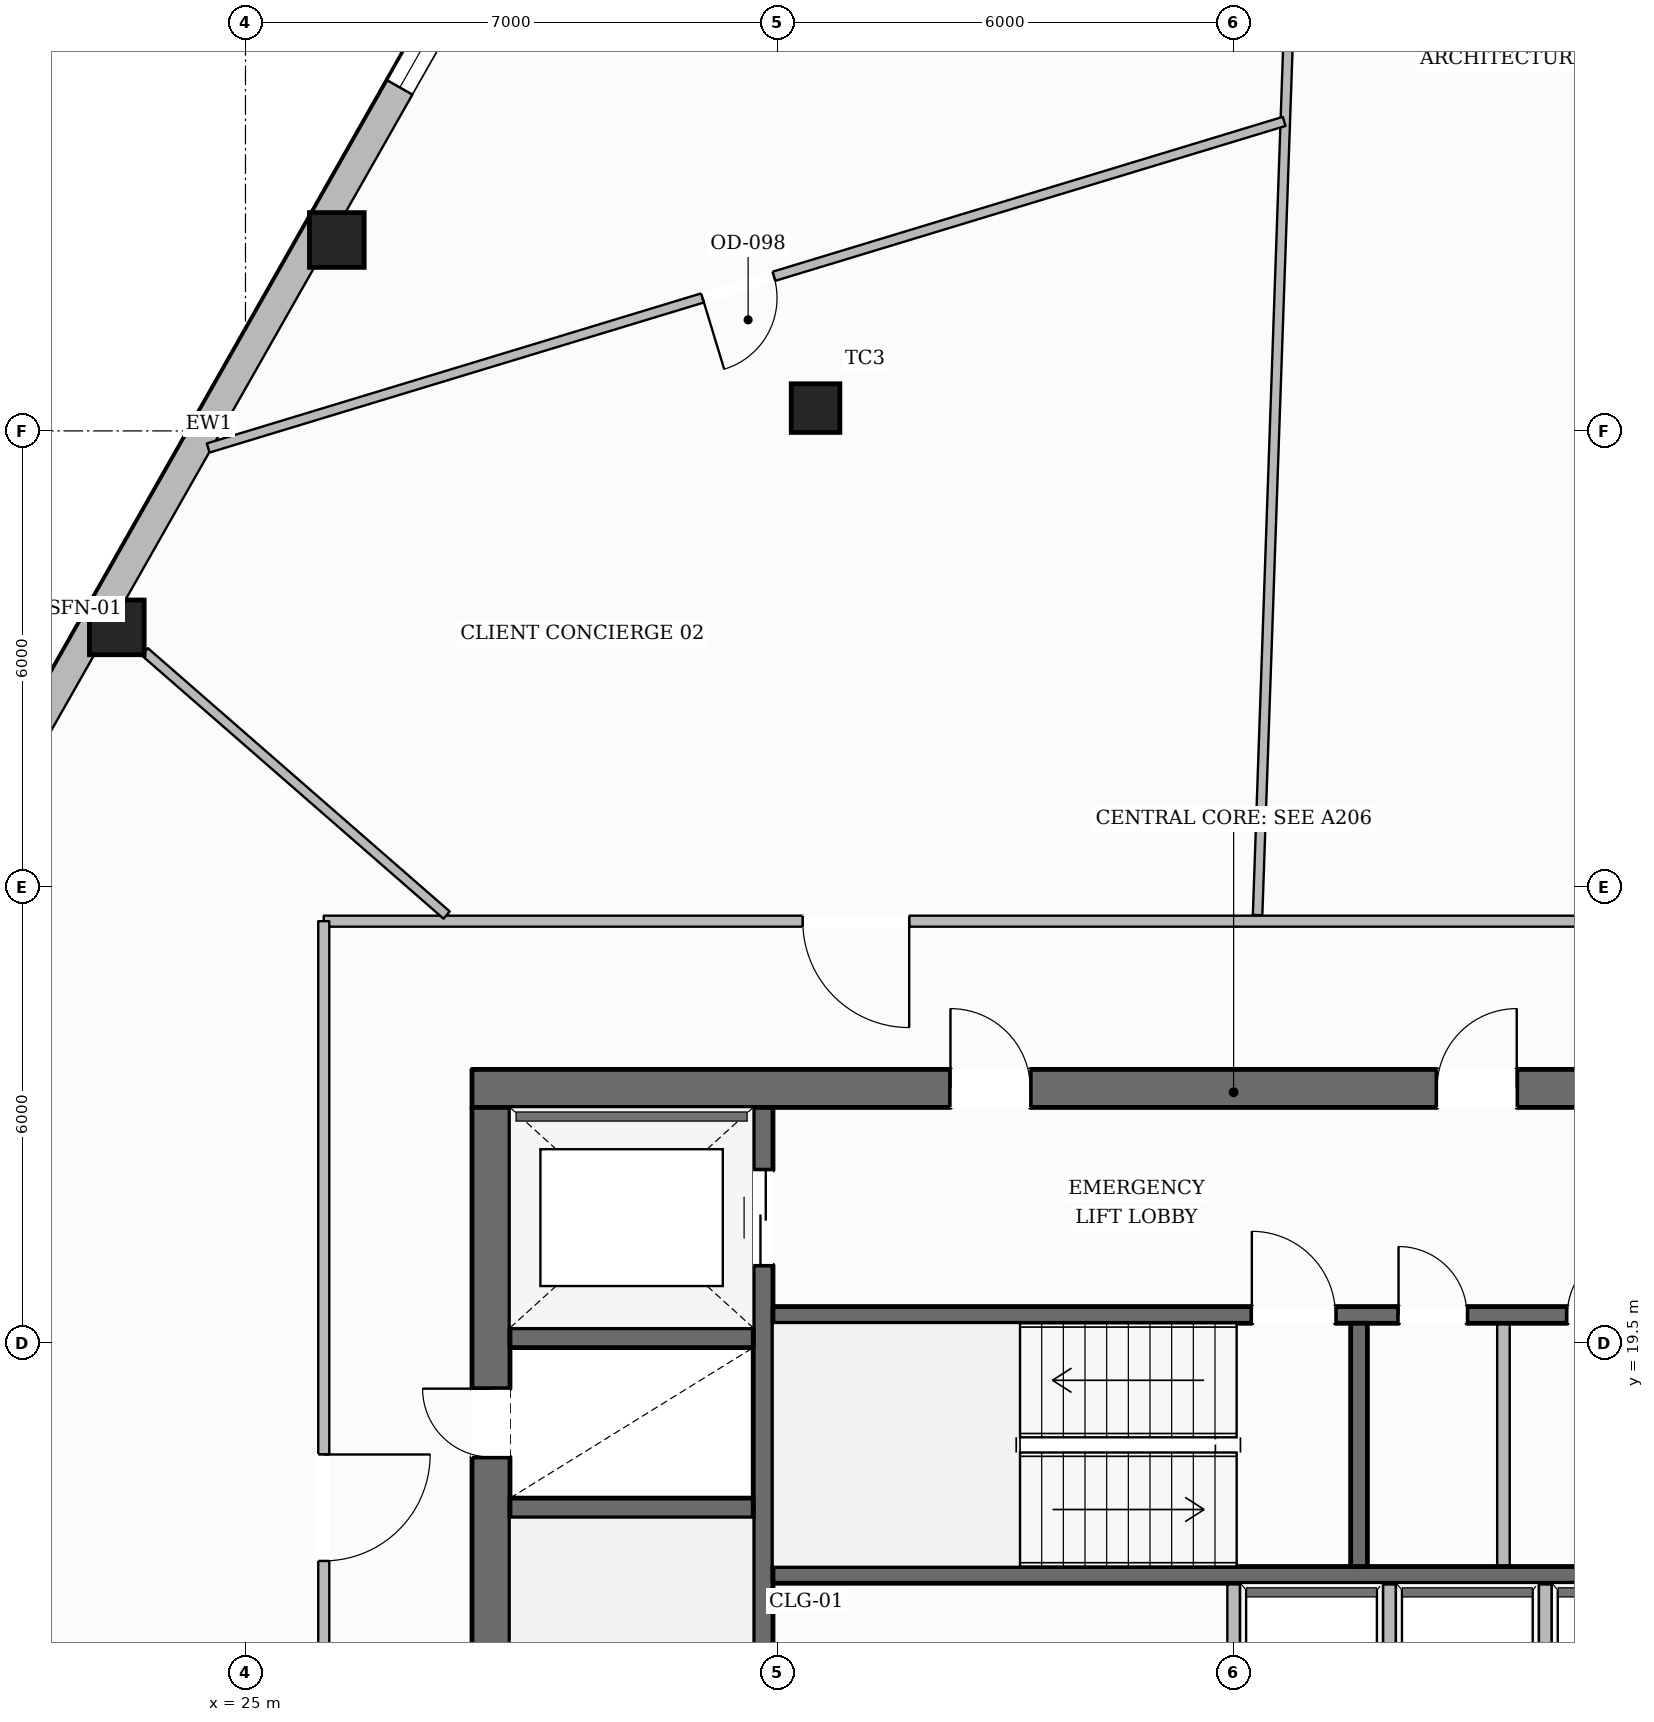
"""IFC4 building model, lengths in metres.
Left out: names, types, materials, properties, quantities, classifications, styles, units other than length and angle.
Written with IfcOpenShell. Run it as: python <this file> out.ifc"""

import sys

from ifc_helpers import new_model, si_unit, direction, frame, frame_2d, origin, origin_2d, place, context, subcontext, project, spatial, rectangle, hollow_rectangle, extrude, element, fill, save


model = new_model("IFC4")
c1 = context("Model", 3, precision=1e-05, world=origin(), true_north=direction((0.0, 1.0)))
c2 = subcontext(c1, "Body", "Model", "MODEL_VIEW")
j1 = project(units=[si_unit("LENGTHUNIT", "METRE"), si_unit("PLANEANGLEUNIT", "RADIAN")], contexts=[c1])
p1 = place(None, origin())
s1 = spatial("IfcSite", under=j1, at=p1, CompositionType="ELEMENT")
p2 = place(p1, origin())
s2 = spatial("IfcBuilding", under=s1, at=p2, CompositionType="ELEMENT")
p3 = place(p2, frame((0.0, 0.0, 104.75)))
s3 = spatial("IfcBuildingStorey", under=s2, at=p3, CompositionType="ELEMENT", Elevation=104.75)
p4 = place(p3, frame((27.98, 22.85, 0.0), z_axis=(0.0, 0.0, 1.0), x_axis=(1.0, 0.0, 0.0)))
e1 = element("IfcWall", 1, at=p4, inside=s3, PredefinedType="SOLIDWALL", context=c2, shape_type="SweptSolid", body=[
    extrude(rectangle(XDim=20.04, YDim=0.5, at=frame_2d((10.02, 0.0))), origin(), (0.0, 0.0, 1.0), 3.6),
])
p5 = place(p4, frame((6.295, 0.0, 0.0)))
e2 = element("IfcOpeningElement", 2, at=p5, cuts=e1, PredefinedType="OPENING", context=c2, shape_type="SweptSolid", body=[
    extrude(rectangle(XDim=1.05, YDim=2.15, at=frame_2d((0.525, 1.075))), frame((0.0, 0.26, 0.0), z_axis=(0.0, -1.0, 0.0), x_axis=(1.0, 0.0, 0.0)), (0.0, 0.0, 1.0), 0.52),
])
p6 = place(p4, frame((12.695, 0.0, 0.0)))
e3 = element("IfcOpeningElement", 3, at=p6, cuts=e1, PredefinedType="OPENING", context=c2, shape_type="SweptSolid", body=[
    extrude(rectangle(XDim=1.05, YDim=2.15, at=frame_2d((0.525, 1.075))), frame((0.0, 0.26, 0.0), z_axis=(0.0, -1.0, 0.0), x_axis=(1.0, 0.0, 0.0)), (0.0, 0.0, 1.0), 0.52),
])
p7 = place(p3, frame((28.23, 9.6, 0.0), z_axis=(0.0, 0.0, 1.0), x_axis=(0.0, 1.0, 0.0)))
e4 = element("IfcWall", 4, at=p7, inside=s3, PredefinedType="SOLIDWALL", context=c2, shape_type="SweptSolid", body=[
    extrude(rectangle(XDim=13.0, YDim=0.5, at=frame_2d((6.5, 0.0))), origin(), (0.0, 0.0, 1.0), 3.6),
])
p8 = place(p7, frame((0.2, 0.0, 0.0)))
e5 = element("IfcOpeningElement", 5, at=p8, cuts=e4, PredefinedType="OPENING", context=c2, shape_type="SweptSolid", body=[
    extrude(rectangle(XDim=1.1, YDim=2.15, at=frame_2d((0.55, 1.075))), frame((0.0, 0.26, 0.0), z_axis=(0.0, -1.0, 0.0), x_axis=(1.0, 0.0, 0.0)), (0.0, 0.0, 1.0), 0.52),
])
p9 = place(p7, frame((8.4, 0.0, 0.0)))
e6 = element("IfcOpeningElement", 6, at=p9, cuts=e4, PredefinedType="OPENING", context=c2, shape_type="SweptSolid", body=[
    extrude(rectangle(XDim=0.9, YDim=2.1, at=frame_2d((0.45, 1.05))), frame((0.0, 0.26, 0.0), z_axis=(0.0, -1.0, 0.0), x_axis=(1.0, 0.0, 0.0)), (0.0, 0.0, 1.0), 0.52),
])
p10 = place(p3, frame((31.81, 9.6, 0.0), z_axis=(0.0, 0.0, 1.0), x_axis=(0.0, 1.0, 0.0)))
e7 = element("IfcWall", 7, at=p10, inside=s3, PredefinedType="SHEAR", context=c2, shape_type="SweptSolid", body=[
    extrude(rectangle(XDim=13.0, YDim=0.26, at=frame_2d((6.5, 0.0))), origin(), (0.0, 0.0, 1.0), 3.6),
])
p11 = place(p10, frame((10.925, 0.0, 0.0)))
e8 = element("IfcOpeningElement", 8, at=p11, cuts=e7, PredefinedType="OPENING", context=c2, shape_type="SweptSolid", body=[
    extrude(rectangle(XDim=1.25, YDim=2.25, at=frame_2d((0.625, 1.125))), frame((0.0, 0.14, 0.0), z_axis=(0.0, -1.0, 0.0), x_axis=(1.0, 0.0, 0.0)), (0.0, 0.0, 1.0), 0.28),
])
for number, where, z_axis, x_axis in (
    (9, (28.48, 17.33, 0.0), (0.0, 0.0, 1.0), (1.0, 0.0, 0.0)),
    (10, (28.48, 19.57, 0.0), (0.0, 0.0, 1.0), (1.0, 0.0, 0.0)),
):
    element("IfcWall", number, at=place(p3, frame(where, z_axis=z_axis, x_axis=x_axis)), inside=s3, PredefinedType="SHEAR", context=c2, shape_type="SweptSolid", body=[
        extrude(rectangle(XDim=3.2, YDim=0.26, at=frame_2d((1.6, 0.0))), origin(), (0.0, 0.0, 1.0), 3.6),
    ])
p12 = place(p3, frame((31.94, 19.87, 0.0), z_axis=(0.0, 0.0, 1.0), x_axis=(1.0, 0.0, 0.0)))
e11 = element("IfcWall", 11, at=p12, inside=s3, PredefinedType="SOLIDWALL", context=c2, shape_type="SweptSolid", body=[
    extrude(rectangle(XDim=12.12, YDim=0.22, at=frame_2d((6.06, 0.0))), origin(), (0.0, 0.0, 1.0), 3.6),
])
p13 = place(p12, frame((6.3, 0.0, 0.0)))
e12 = element("IfcOpeningElement", 12, at=p13, cuts=e11, PredefinedType="OPENING", context=c2, shape_type="SweptSolid", body=[
    extrude(rectangle(XDim=1.1, YDim=2.15, at=frame_2d((0.55, 1.075))), frame((0.0, 0.12, 0.0), z_axis=(0.0, -1.0, 0.0), x_axis=(1.0, 0.0, 0.0)), (0.0, 0.0, 1.0), 0.24),
])
p14 = place(p12, frame((8.23, 0.0, 0.0)))
e13 = element("IfcOpeningElement", 13, at=p14, cuts=e11, PredefinedType="OPENING", context=c2, shape_type="SweptSolid", body=[
    extrude(rectangle(XDim=0.9, YDim=2.1, at=frame_2d((0.45, 1.05))), frame((0.0, 0.12, 0.0), z_axis=(0.0, -1.0, 0.0), x_axis=(1.0, 0.0, 0.0)), (0.0, 0.0, 1.0), 0.24),
])
p15 = place(p12, frame((10.45, 0.0, 0.0)))
e14 = element("IfcOpeningElement", 14, at=p15, cuts=e11, PredefinedType="OPENING", context=c2, shape_type="SweptSolid", body=[
    extrude(rectangle(XDim=0.9, YDim=2.1, at=frame_2d((0.45, 1.05))), frame((0.0, 0.12, 0.0), z_axis=(0.0, -1.0, 0.0), x_axis=(1.0, 0.0, 0.0)), (0.0, 0.0, 1.0), 0.24),
])
p16 = place(p3, frame((31.94, 16.45, 0.0), z_axis=(0.0, 0.0, 1.0), x_axis=(1.0, 0.0, 0.0)))
e15 = element("IfcWall", 15, at=p16, inside=s3, PredefinedType="SOLIDWALL", context=c2, shape_type="SweptSolid", body=[
    extrude(rectangle(XDim=12.12, YDim=0.22, at=frame_2d((6.06, 0.0))), origin(), (0.0, 0.0, 1.0), 3.6),
])
p17 = place(p3, frame((39.65, 16.56, 0.0), z_axis=(0.0, 0.0, 1.0), x_axis=(0.0, 1.0, 0.0)))
e16 = element("IfcWall", 16, at=p17, inside=s3, PredefinedType="SOLIDWALL", context=c2, shape_type="SweptSolid", body=[
    extrude(rectangle(XDim=3.2, YDim=0.22, at=frame_2d((1.6, 0.0))), origin(), (0.0, 0.0, 1.0), 3.6),
])
for number, where, z_axis, x_axis in (
    (17, (26.202, 34.012, 0.0), (0.0, 0.0, 1.0), (1.0, 0.0, 0.0)),
    (18, (23.307, 28.915, 0.0), (0.0, 0.0, 1.0), (1.0, 0.0, 0.0)),
):
    element("IfcColumn", number, at=place(p3, frame(where, z_axis=z_axis, x_axis=x_axis)), inside=s3, PredefinedType="COLUMN", context=c2, shape_type="SweptSolid", body=[
        extrude(hollow_rectangle(XDim=0.72, YDim=0.72, WallThickness=0.032, at=origin_2d()), origin(), (0.0, 0.0, 1.0), 3.6),
    ])
p18 = place(p3, frame((32.5, 31.8, 0.0), z_axis=(0.0, 0.0, 1.0), x_axis=(1.0, 0.0, 0.0)))
e19 = element("IfcColumn", 19, at=p18, inside=s3, PredefinedType="COLUMN", context=c2, shape_type="SweptSolid", body=[
    extrude(hollow_rectangle(XDim=0.64, YDim=0.64, WallThickness=0.028, at=origin_2d()), origin(), (0.0, 0.0, 1.0), 3.6),
])
p19 = place(p3, frame((14.155, 13.347, 0.0), z_axis=(0.0, 0.0, 1.0), x_axis=(0.493868426836, 0.869536644986, 0.0)))
e20 = element("IfcWall", 20, at=p19, inside=s3, PredefinedType="STANDARD", context=c2, shape_type="SweptSolid", body=[
    extrude(rectangle(XDim=36.121, YDim=0.38, at=frame_2d((18.061, 0.0))), origin(), (0.0, 0.0, 1.0), 3.059),
])
p20 = place(p19, frame((31.935, 0.0, 0.65)))
e21 = element("IfcOpeningElement", 21, at=p20, cuts=e20, PredefinedType="OPENING", context=c2, shape_type="SweptSolid", body=[
    extrude(rectangle(XDim=1.55, YDim=1.75, at=frame_2d((0.775, 0.875))), frame((0.0, 0.2, 0.0), z_axis=(0.0, -1.0, 0.0), x_axis=(1.0, 0.0, 0.0)), (0.0, 0.0, 1.0), 0.4),
])
p21 = place(p19, frame((26.073, 0.0, 0.65)))
e22 = element("IfcOpeningElement", 22, at=p21, cuts=e20, PredefinedType="OPENING", context=c2, shape_type="SweptSolid", body=[
    extrude(rectangle(XDim=1.55, YDim=1.75, at=frame_2d((0.775, 0.875))), frame((0.0, 0.2, 0.0), z_axis=(0.0, -1.0, 0.0), x_axis=(1.0, 0.0, 0.0)), (0.0, 0.0, 1.0), 0.4),
])
p22 = place(p19, frame((14.352, 0.0, 0.65)))
e23 = element("IfcOpeningElement", 23, at=p22, cuts=e20, PredefinedType="OPENING", context=c2, shape_type="SweptSolid", body=[
    extrude(rectangle(XDim=1.55, YDim=1.75, at=frame_2d((0.775, 0.875))), frame((0.0, 0.2, 0.0), z_axis=(0.0, -1.0, 0.0), x_axis=(1.0, 0.0, 0.0)), (0.0, 0.0, 1.0), 0.4),
])
p23 = place(p19, frame((8.491, 0.0, 0.65)))
e24 = element("IfcOpeningElement", 24, at=p23, cuts=e20, PredefinedType="OPENING", context=c2, shape_type="SweptSolid", body=[
    extrude(rectangle(XDim=1.55, YDim=1.75, at=frame_2d((0.775, 0.875))), frame((0.0, 0.2, 0.0), z_axis=(0.0, -1.0, 0.0), x_axis=(1.0, 0.0, 0.0)), (0.0, 0.0, 1.0), 0.4),
])
p24 = place(p19, frame((2.63, 0.0, 0.65)))
e25 = element("IfcOpeningElement", 25, at=p24, cuts=e20, PredefinedType="OPENING", context=c2, shape_type="SweptSolid", body=[
    extrude(rectangle(XDim=1.55, YDim=1.75, at=frame_2d((0.775, 0.875))), frame((0.0, 0.2, 0.0), z_axis=(0.0, -1.0, 0.0), x_axis=(1.0, 0.0, 0.0)), (0.0, 0.0, 1.0), 0.4),
])
for number, where, z_axis, x_axis in (
    (26, (38.0, 14.1, 0.0), (0.0, 0.0, 1.0), (0.0, 1.0, 0.0)),
    (27, (40.05, 14.1, 0.0), (0.0, 0.0, 1.0), (0.0, 1.0, 0.0)),
    (28, (42.1, 14.1, 0.0), (0.0, 0.0, 1.0), (0.0, 1.0, 0.0)),
):
    element("IfcWall", number, at=place(p3, frame(where, z_axis=z_axis, x_axis=x_axis)), inside=s3, PredefinedType="PARTITIONING", context=c2, shape_type="SweptSolid", body=[
        extrude(rectangle(XDim=2.24, YDim=0.165, at=frame_2d((1.12, 0.0))), origin(), (0.0, 0.0, 1.0), 3.6),
    ])
p25 = place(p3, frame((41.55, 16.56, 0.0), z_axis=(0.0, 0.0, 1.0), x_axis=(0.0, 1.0, 0.0)))
e29 = element("IfcWall", 29, at=p25, inside=s3, PredefinedType="PARTITIONING", context=c2, shape_type="SweptSolid", body=[
    extrude(rectangle(XDim=3.2, YDim=0.165, at=frame_2d((1.6, 0.0))), origin(), (0.0, 0.0, 1.0), 3.6),
])
p26 = place(p3, frame((49.97, 25.05, 0.0), z_axis=(0.0, 0.0, 1.0), x_axis=(-1.0, 0.0, 0.0)))
e30 = element("IfcWall", 30, at=p26, inside=s3, PredefinedType="PARTITIONING", context=c2, shape_type="SweptSolid", body=[
    extrude(rectangle(XDim=23.94, YDim=0.145, at=frame_2d((11.97, 0.0))), origin(), (0.0, 0.0, 1.0), 3.6),
])
p27 = place(p26, frame((5.824, 0.0, 0.0)))
e31 = element("IfcOpeningElement", 31, at=p27, cuts=e30, PredefinedType="OPENING", context=c2, shape_type="SweptSolid", body=[
    extrude(rectangle(XDim=1.4, YDim=2.2, at=frame_2d((0.7, 1.1))), frame((0.0, 0.083, 0.0), z_axis=(0.0, -1.0, 0.0), x_axis=(1.0, 0.0, 0.0)), (0.0, 0.0, 1.0), 0.165),
])
p28 = place(p26, frame((16.238, 0.0, 0.0)))
e32 = element("IfcOpeningElement", 32, at=p28, cuts=e30, PredefinedType="OPENING", context=c2, shape_type="SweptSolid", body=[
    extrude(rectangle(XDim=1.4, YDim=2.2, at=frame_2d((0.7, 1.1))), frame((0.0, 0.083, 0.0), z_axis=(0.0, -1.0, 0.0), x_axis=(1.0, 0.0, 0.0)), (0.0, 0.0, 1.0), 0.165),
])
p29 = place(p3, frame((26.03, 25.05, 0.0), z_axis=(0.0, 0.0, 1.0), x_axis=(0.0, -1.0, 0.0)))
e33 = element("IfcWall", 33, at=p29, inside=s3, PredefinedType="PARTITIONING", context=c2, shape_type="SweptSolid", body=[
    extrude(rectangle(XDim=17.9, YDim=0.145, at=frame_2d((8.95, 0.0))), origin(), (0.0, 0.0, 1.0), 3.288),
])
p30 = place(p29, frame((7.016, 0.0, 0.0)))
e34 = element("IfcOpeningElement", 34, at=p30, cuts=e33, PredefinedType="OPENING", context=c2, shape_type="SweptSolid", body=[
    extrude(rectangle(XDim=1.4, YDim=2.2, at=frame_2d((0.7, 1.1))), frame((0.0, 0.083, 0.0), z_axis=(0.0, -1.0, 0.0), x_axis=(1.0, 0.0, 0.0)), (0.0, 0.0, 1.0), 0.165),
])
p31 = place(p3, frame((38.315, 25.131, 0.0), z_axis=(0.0, 0.0, 1.0), x_axis=(0.03489139659, 0.999391109848, 0.0)))
e35 = element("IfcWall", 35, at=p31, inside=s3, PredefinedType="PARTITIONING", context=c2, shape_type="SweptSolid", body=[
    extrude(rectangle(XDim=19.144, YDim=0.125, at=frame_2d((9.572, 0.0))), origin(), (0.0, 0.0, 1.0), 3.6),
])
p32 = place(p3, frame((27.646, 25.131, 0.0), z_axis=(0.0, 0.0, 1.0), x_axis=(-0.753603237889, 0.657329567145, 0.0)))
e36 = element("IfcWall", 36, at=p32, inside=s3, PredefinedType="PARTITIONING", context=c2, shape_type="SweptSolid", body=[
    extrude(rectangle(XDim=5.27, YDim=0.125, at=frame_2d((2.635, 0.0))), origin(), (0.0, 0.0, 1.0), 3.141),
])
p33 = place(p3, frame((38.665, 35.572, 0.0), z_axis=(0.0, 0.0, 1.0), x_axis=(-0.956891470712, -0.290445714856, 0.0)))
e37 = element("IfcWall", 37, at=p33, inside=s3, PredefinedType="PARTITIONING", context=c2, shape_type="SweptSolid", body=[
    extrude(rectangle(XDim=14.793, YDim=0.125, at=frame_2d((7.396, 0.0))), origin(), (0.0, 0.0, 1.0), 3.288),
])
p34 = place(p33, frame((7.016, 0.0, 0.0)))
e38 = element("IfcOpeningElement", 38, at=p34, cuts=e37, PredefinedType="OPENING", context=c2, shape_type="SweptSolid", body=[
    extrude(rectangle(XDim=0.98, YDim=2.15, at=frame_2d((0.49, 1.075))), frame((0.0, 0.073, 0.0), z_axis=(0.0, -1.0, 0.0), x_axis=(1.0, 0.0, 0.0)), (0.0, 0.0, 1.0), 0.145),
])
p35 = place(p21, origin())
e39 = element("IfcWindow", 39, at=p35, inside=s3, PartitioningType="SINGLE_PANEL", PredefinedType="WINDOW", context=c2, shape_type="SweptSolid", body=[
    extrude(rectangle(XDim=1.55, YDim=1.75, at=frame_2d((0.775, 0.875))), frame((0.0, 0.03, 0.0), z_axis=(0.0, -1.0, 0.0), x_axis=(1.0, 0.0, 0.0)), (0.0, 0.0, 1.0), 0.06),
])
fill(e22, e39)
p36 = place(p13, origin())
e40 = element("IfcDoor", 40, at=p36, inside=s3, OperationType="SINGLE_SWING_LEFT", PredefinedType="DOOR", context=c2, shape_type="SweptSolid", body=[
    extrude(rectangle(XDim=1.1, YDim=2.15, at=frame_2d((0.55, 1.075))), frame((0.0, 0.025, 0.0), z_axis=(0.0, -1.0, 0.0), x_axis=(1.0, 0.0, 0.0)), (0.0, 0.0, 1.0), 0.05),
])
fill(e12, e40)
p37 = place(p9, origin())
e41 = element("IfcDoor", 41, at=p37, inside=s3, OperationType="SINGLE_SWING_RIGHT", PredefinedType="DOOR", context=c2, shape_type="SweptSolid", body=[
    extrude(rectangle(XDim=0.9, YDim=2.1, at=frame_2d((0.45, 1.05))), frame((0.0, 0.025, 0.0), z_axis=(0.0, -1.0, 0.0), x_axis=(1.0, 0.0, 0.0)), (0.0, 0.0, 1.0), 0.05),
])
fill(e6, e41)
p38 = place(p5, origin())
e42 = element("IfcDoor", 42, at=p38, inside=s3, OperationType="SINGLE_SWING_LEFT", PredefinedType="DOOR", context=c2, shape_type="SweptSolid", body=[
    extrude(rectangle(XDim=1.05, YDim=2.15, at=frame_2d((0.525, 1.075))), frame((0.0, 0.025, 0.0), z_axis=(0.0, -1.0, 0.0), x_axis=(1.0, 0.0, 0.0)), (0.0, 0.0, 1.0), 0.05),
])
fill(e2, e42)
p39 = place(p6, origin())
e43 = element("IfcDoor", 43, at=p39, inside=s3, OperationType="SINGLE_SWING_RIGHT", PredefinedType="DOOR", context=c2, shape_type="SweptSolid", body=[
    extrude(rectangle(XDim=1.05, YDim=2.15, at=frame_2d((0.525, 1.075))), frame((0.0, 0.025, 0.0), z_axis=(0.0, -1.0, 0.0), x_axis=(1.0, 0.0, 0.0)), (0.0, 0.0, 1.0), 0.05),
])
fill(e3, e43)
p40 = place(p11, origin())
e44 = element("IfcDoor", 44, at=p40, inside=s3, OperationType="DOUBLE_DOOR_SLIDING", PredefinedType="DOOR", context=c2, shape_type="SweptSolid", body=[
    extrude(rectangle(XDim=1.25, YDim=2.25, at=frame_2d((0.625, 1.125))), frame((0.0, 0.025, 0.0), z_axis=(0.0, -1.0, 0.0), x_axis=(1.0, 0.0, 0.0)), (0.0, 0.0, 1.0), 0.05),
])
fill(e8, e44)
p41 = place(p14, origin())
e45 = element("IfcDoor", 45, at=p41, inside=s3, OperationType="SINGLE_SWING_LEFT", PredefinedType="DOOR", context=c2, shape_type="SweptSolid", body=[
    extrude(rectangle(XDim=0.9, YDim=2.1, at=frame_2d((0.45, 1.05))), frame((0.0, 0.025, 0.0), z_axis=(0.0, -1.0, 0.0), x_axis=(1.0, 0.0, 0.0)), (0.0, 0.0, 1.0), 0.05),
])
fill(e13, e45)
p42 = place(p15, origin())
e46 = element("IfcDoor", 46, at=p42, inside=s3, OperationType="SINGLE_SWING_RIGHT", PredefinedType="DOOR", context=c2, shape_type="SweptSolid", body=[
    extrude(rectangle(XDim=0.9, YDim=2.1, at=frame_2d((0.45, 1.05))), frame((0.0, 0.025, 0.0), z_axis=(0.0, -1.0, 0.0), x_axis=(1.0, 0.0, 0.0)), (0.0, 0.0, 1.0), 0.05),
])
fill(e14, e46)
p43 = place(p28, origin())
e47 = element("IfcDoor", 47, at=p43, inside=s3, OperationType="SINGLE_SWING_LEFT", PredefinedType="DOOR", context=c2, shape_type="SweptSolid", body=[
    extrude(rectangle(XDim=1.4, YDim=2.2, at=frame_2d((0.7, 1.1))), frame((0.0, 0.025, 0.0), z_axis=(0.0, -1.0, 0.0), x_axis=(1.0, 0.0, 0.0)), (0.0, 0.0, 1.0), 0.05),
])
fill(e32, e47)
p44 = place(p34, origin())
e48 = element("IfcDoor", 48, at=p44, inside=s3, OperationType="SINGLE_SWING_RIGHT", PredefinedType="DOOR", context=c2, shape_type="SweptSolid", body=[
    extrude(rectangle(XDim=0.98, YDim=2.15, at=frame_2d((0.49, 1.075))), frame((0.0, 0.025, 0.0), z_axis=(0.0, -1.0, 0.0), x_axis=(1.0, 0.0, 0.0)), (0.0, 0.0, 1.0), 0.05),
])
fill(e38, e48)
p45 = place(p30, origin())
e49 = element("IfcDoor", 49, at=p45, inside=s3, OperationType="SINGLE_SWING_LEFT", PredefinedType="DOOR", context=c2, shape_type="SweptSolid", body=[
    extrude(rectangle(XDim=1.4, YDim=2.2, at=frame_2d((0.7, 1.1))), frame((0.0, 0.025, 0.0), z_axis=(0.0, -1.0, 0.0), x_axis=(1.0, 0.0, 0.0)), (0.0, 0.0, 1.0), 0.05),
])
fill(e34, e49)
save(model, sys.argv[1])
